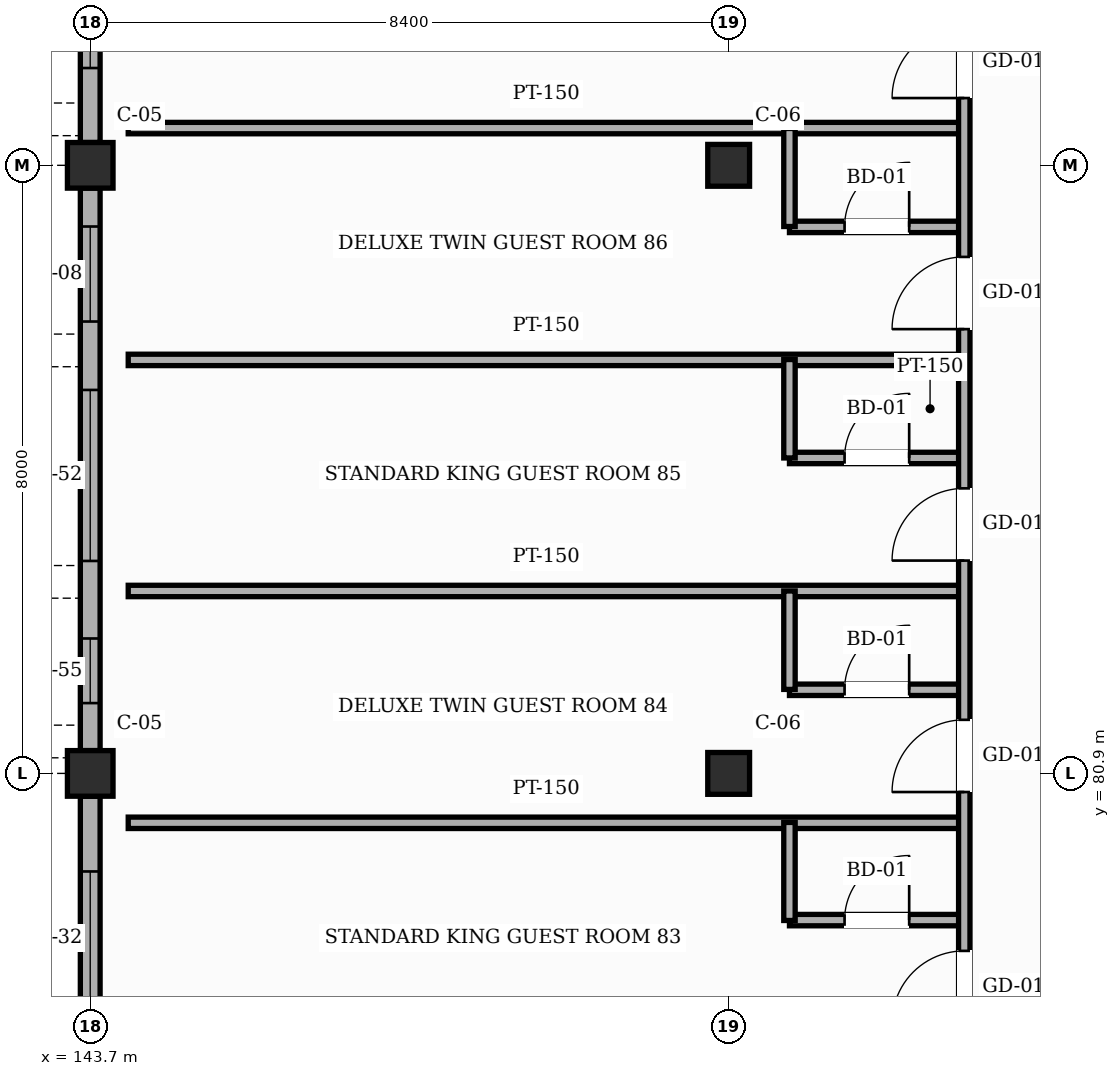
"""IFC4 building model, lengths in metres.
Left out: names, types, materials, properties, quantities, classifications, styles, units other than length and angle.
Written with IfcOpenShell. Run it as: python <this file> out.ifc"""

import sys

from ifc_helpers import new_model, si_unit, direction, frame, frame_2d, origin, origin_2d, place, context, subcontext, project, spatial, rectangle, hollow_rectangle, extrude, element, fill, save


model = new_model("IFC4")
c1 = context("Model", 3, precision=1e-05, world=origin(), true_north=direction((0.0, 1.0)))
c2 = subcontext(c1, "Body", "Model", "MODEL_VIEW")
j1 = project(units=[si_unit("LENGTHUNIT", "METRE"), si_unit("PLANEANGLEUNIT", "RADIAN")], contexts=[c1])
p1 = place(None, origin())
s1 = spatial("IfcSite", under=j1, at=p1, CompositionType="ELEMENT")
p2 = place(p1, origin())
s2 = spatial("IfcBuilding", under=s1, at=p2, CompositionType="ELEMENT")
p3 = place(p2, frame((0.0, 0.0, 24.6)))
s3 = spatial("IfcBuildingStorey", under=s2, at=p3, CompositionType="ELEMENT", Elevation=24.6)
for number, where, z_axis, x_axis in (
    (1, (143.7, 80.9, 0.0), (0.0, 0.0, 1.0), (1.0, 0.0, 0.0)),
    (2, (143.7, 88.9, 0.0), (0.0, 0.0, 1.0), (1.0, 0.0, 0.0)),
):
    element("IfcColumn", number, at=place(p3, frame(where, z_axis=z_axis, x_axis=x_axis)), inside=s3, PredefinedType="COLUMN", context=c2, shape_type="SweptSolid", body=[
        extrude(hollow_rectangle(XDim=0.6, YDim=0.6, WallThickness=0.025, InnerFilletRadius=0.025, OuterFilletRadius=0.05, at=origin_2d()), origin(), (0.0, 0.0, 1.0), 3.6),
    ])
for number, where, z_axis, x_axis in (
    (3, (152.1, 80.9, 0.0), (0.0, 0.0, 1.0), (1.0, 0.0, 0.0)),
    (4, (152.1, 88.9, 0.0), (0.0, 0.0, 1.0), (1.0, 0.0, 0.0)),
):
    element("IfcColumn", number, at=place(p3, frame(where, z_axis=z_axis, x_axis=x_axis)), inside=s3, PredefinedType="COLUMN", context=c2, shape_type="SweptSolid", body=[
        extrude(hollow_rectangle(XDim=0.55, YDim=0.55, WallThickness=0.022, InnerFilletRadius=0.022, OuterFilletRadius=0.044, at=origin_2d()), origin(), (0.0, 0.0, 1.0), 3.6),
    ])
p4 = place(p3, frame((143.7, 73.65, 0.0), z_axis=(0.0, 0.0, 1.0), x_axis=(0.0, 1.0, 0.0)))
e5 = element("IfcWall", 5, at=p4, inside=s3, PredefinedType="SOLIDWALL", context=c2, shape_type="SweptSolid", body=[
    extrude(rectangle(XDim=6.95, YDim=0.26, at=frame_2d((3.475, 0.0))), origin(), (0.0, 0.0, 1.0), 2.805),
])
p5 = place(p4, frame((1.265, 0.0, 0.85)))
e6 = element("IfcOpeningElement", 6, at=p5, cuts=e5, PredefinedType="OPENING", context=c2, shape_type="SweptSolid", body=[
    extrude(rectangle(XDim=1.55, YDim=1.5, at=frame_2d((0.775, 0.75))), frame((0.0, 0.14, 0.0), z_axis=(0.0, -1.0, 0.0), x_axis=(1.0, 0.0, 0.0)), (0.0, 0.0, 1.0), 0.28),
])
p6 = place(p4, frame((4.21, 0.0, 0.85)))
e7 = element("IfcOpeningElement", 7, at=p6, cuts=e5, PredefinedType="OPENING", context=c2, shape_type="SweptSolid", body=[
    extrude(rectangle(XDim=1.75, YDim=1.5, at=frame_2d((0.875, 0.75))), frame((0.0, 0.14, 0.0), z_axis=(0.0, -1.0, 0.0), x_axis=(1.0, 0.0, 0.0)), (0.0, 0.0, 1.0), 0.28),
])
p7 = place(p3, frame((143.7, 81.2, 0.0), z_axis=(0.0, 0.0, 1.0), x_axis=(0.0, 1.0, 0.0)))
e8 = element("IfcWall", 8, at=p7, inside=s3, PredefinedType="SOLIDWALL", context=c2, shape_type="SweptSolid", body=[
    extrude(rectangle(XDim=7.4, YDim=0.26, at=frame_2d((3.7, 0.0))), origin(), (0.0, 0.0, 1.0), 2.805),
])
p8 = place(p7, frame((0.625, 0.0, 0.85)))
e9 = element("IfcOpeningElement", 9, at=p8, cuts=e8, PredefinedType="OPENING", context=c2, shape_type="SweptSolid", body=[
    extrude(rectangle(XDim=0.85, YDim=1.35, at=frame_2d((0.425, 0.675))), frame((0.0, 0.14, 0.0), z_axis=(0.0, -1.0, 0.0), x_axis=(1.0, 0.0, 0.0)), (0.0, 0.0, 1.0), 0.28),
])
p9 = place(p7, frame((2.495, 0.0, 0.85)))
e10 = element("IfcOpeningElement", 10, at=p9, cuts=e8, PredefinedType="OPENING", context=c2, shape_type="SweptSolid", body=[
    extrude(rectangle(XDim=2.25, YDim=1.5, at=frame_2d((1.125, 0.75))), frame((0.0, 0.14, 0.0), z_axis=(0.0, -1.0, 0.0), x_axis=(1.0, 0.0, 0.0)), (0.0, 0.0, 1.0), 0.28),
])
p10 = place(p7, frame((5.645, 0.0, 0.85)))
e11 = element("IfcOpeningElement", 11, at=p10, cuts=e8, PredefinedType="OPENING", context=c2, shape_type="SweptSolid", body=[
    extrude(rectangle(XDim=1.25, YDim=1.65, at=frame_2d((0.625, 0.825))), frame((0.0, 0.14, 0.0), z_axis=(0.0, -1.0, 0.0), x_axis=(1.0, 0.0, 0.0)), (0.0, 0.0, 1.0), 0.28),
])
p11 = place(p3, frame((143.7, 89.2, 0.0), z_axis=(0.0, 0.0, 1.0), x_axis=(0.0, 1.0, 0.0)))
e12 = element("IfcWall", 12, at=p11, inside=s3, PredefinedType="SOLIDWALL", context=c2, shape_type="SweptSolid", body=[
    extrude(rectangle(XDim=7.4, YDim=0.26, at=frame_2d((3.7, 0.0))), origin(), (0.0, 0.0, 1.0), 2.805),
])
p12 = place(p11, frame((0.98, 0.0, 0.85)))
e13 = element("IfcOpeningElement", 13, at=p12, cuts=e12, PredefinedType="OPENING", context=c2, shape_type="SweptSolid", body=[
    extrude(rectangle(XDim=1.45, YDim=1.65, at=frame_2d((0.725, 0.825))), frame((0.0, 0.14, 0.0), z_axis=(0.0, -1.0, 0.0), x_axis=(1.0, 0.0, 0.0)), (0.0, 0.0, 1.0), 0.28),
])
p13 = place(p11, frame((3.925, 0.0, 0.85)))
e14 = element("IfcOpeningElement", 14, at=p13, cuts=e12, PredefinedType="OPENING", context=c2, shape_type="SweptSolid", body=[
    extrude(rectangle(XDim=1.65, YDim=1.65, at=frame_2d((0.825, 0.825))), frame((0.0, 0.14, 0.0), z_axis=(0.0, -1.0, 0.0), x_axis=(1.0, 0.0, 0.0)), (0.0, 0.0, 1.0), 0.28),
])
p14 = place(p3, frame((152.9, 78.97, 0.0), z_axis=(0.0, 0.0, 1.0), x_axis=(1.0, 0.0, 0.0)))
e15 = element("IfcWall", 15, at=p14, inside=s3, PredefinedType="PARTITIONING", context=c2, shape_type="SweptSolid", body=[
    extrude(rectangle(XDim=2.3, YDim=0.15, at=frame_2d((1.15, 0.0))), origin(), (0.0, 0.0, 1.0), 3.365),
])
p15 = place(p14, frame((0.725, 0.0, 0.0)))
e16 = element("IfcOpeningElement", 16, at=p15, cuts=e15, PredefinedType="OPENING", context=c2, shape_type="SweptSolid", body=[
    extrude(rectangle(XDim=0.85, YDim=2.1, at=frame_2d((0.425, 1.05))), frame((0.0, 0.085, 0.0), z_axis=(0.0, -1.0, 0.0), x_axis=(1.0, 0.0, 0.0)), (0.0, 0.0, 1.0), 0.17),
])
p16 = place(p3, frame((144.2, 80.25, 0.0), z_axis=(0.0, 0.0, 1.0), x_axis=(1.0, 0.0, 0.0)))
e17 = element("IfcWall", 17, at=p16, inside=s3, PredefinedType="PARTITIONING", context=c2, shape_type="SweptSolid", body=[
    extrude(rectangle(XDim=11.0, YDim=0.15, at=frame_2d((5.5, 0.0))), origin(), (0.0, 0.0, 1.0), 3.365),
])
p17 = place(p3, frame((152.9, 82.0, 0.0), z_axis=(0.0, 0.0, 1.0), x_axis=(1.0, 0.0, 0.0)))
e18 = element("IfcWall", 18, at=p17, inside=s3, PredefinedType="PARTITIONING", context=c2, shape_type="SweptSolid", body=[
    extrude(rectangle(XDim=2.3, YDim=0.15, at=frame_2d((1.15, 0.0))), origin(), (0.0, 0.0, 1.0), 3.365),
])
p18 = place(p17, frame((0.725, 0.0, 0.0)))
e19 = element("IfcOpeningElement", 19, at=p18, cuts=e18, PredefinedType="OPENING", context=c2, shape_type="SweptSolid", body=[
    extrude(rectangle(XDim=0.85, YDim=2.1, at=frame_2d((0.425, 1.05))), frame((0.0, 0.085, 0.0), z_axis=(0.0, -1.0, 0.0), x_axis=(1.0, 0.0, 0.0)), (0.0, 0.0, 1.0), 0.17),
])
p19 = place(p3, frame((144.2, 83.3, 0.0), z_axis=(0.0, 0.0, 1.0), x_axis=(1.0, 0.0, 0.0)))
e20 = element("IfcWall", 20, at=p19, inside=s3, PredefinedType="PARTITIONING", context=c2, shape_type="SweptSolid", body=[
    extrude(rectangle(XDim=11.0, YDim=0.15, at=frame_2d((5.5, 0.0))), origin(), (0.0, 0.0, 1.0), 3.365),
])
p20 = place(p3, frame((152.9, 85.05, 0.0), z_axis=(0.0, 0.0, 1.0), x_axis=(1.0, 0.0, 0.0)))
e21 = element("IfcWall", 21, at=p20, inside=s3, PredefinedType="PARTITIONING", context=c2, shape_type="SweptSolid", body=[
    extrude(rectangle(XDim=2.3, YDim=0.15, at=frame_2d((1.15, 0.0))), origin(), (0.0, 0.0, 1.0), 3.005),
])
p21 = place(p20, frame((0.725, 0.0, 0.0)))
e22 = element("IfcOpeningElement", 22, at=p21, cuts=e21, PredefinedType="OPENING", context=c2, shape_type="SweptSolid", body=[
    extrude(rectangle(XDim=0.85, YDim=2.1, at=frame_2d((0.425, 1.05))), frame((0.0, 0.085, 0.0), z_axis=(0.0, -1.0, 0.0), x_axis=(1.0, 0.0, 0.0)), (0.0, 0.0, 1.0), 0.17),
])
p22 = place(p3, frame((144.2, 86.34, 0.0), z_axis=(0.0, 0.0, 1.0), x_axis=(1.0, 0.0, 0.0)))
e23 = element("IfcWall", 23, at=p22, inside=s3, PredefinedType="PARTITIONING", context=c2, shape_type="SweptSolid", body=[
    extrude(rectangle(XDim=11.0, YDim=0.15, at=frame_2d((5.5, 0.0))), origin(), (0.0, 0.0, 1.0), 3.365),
])
p23 = place(p3, frame((152.9, 88.09, 0.0), z_axis=(0.0, 0.0, 1.0), x_axis=(1.0, 0.0, 0.0)))
e24 = element("IfcWall", 24, at=p23, inside=s3, PredefinedType="PARTITIONING", context=c2, shape_type="SweptSolid", body=[
    extrude(rectangle(XDim=2.3, YDim=0.15, at=frame_2d((1.15, 0.0))), origin(), (0.0, 0.0, 1.0), 3.365),
])
p24 = place(p23, frame((0.725, 0.0, 0.0)))
e25 = element("IfcOpeningElement", 25, at=p24, cuts=e24, PredefinedType="OPENING", context=c2, shape_type="SweptSolid", body=[
    extrude(rectangle(XDim=0.85, YDim=2.1, at=frame_2d((0.425, 1.05))), frame((0.0, 0.085, 0.0), z_axis=(0.0, -1.0, 0.0), x_axis=(1.0, 0.0, 0.0)), (0.0, 0.0, 1.0), 0.17),
])
p25 = place(p3, frame((144.2, 89.39, 0.0), z_axis=(0.0, 0.0, 1.0), x_axis=(1.0, 0.0, 0.0)))
e26 = element("IfcWall", 26, at=p25, inside=s3, PredefinedType="PARTITIONING", context=c2, shape_type="SweptSolid", body=[
    extrude(rectangle(XDim=11.0, YDim=0.15, at=frame_2d((5.5, 0.0))), origin(), (0.0, 0.0, 1.0), 3.365),
])
p26 = place(p3, frame((152.9, 78.965, 0.0), z_axis=(0.0, 0.0, 1.0), x_axis=(0.0, 1.0, 0.0)))
e27 = element("IfcWall", 27, at=p26, inside=s3, PredefinedType="PARTITIONING", context=c2, shape_type="SweptSolid", body=[
    extrude(rectangle(XDim=1.29, YDim=0.15, at=frame_2d((0.645, 0.0))), origin(), (0.0, 0.0, 1.0), 3.365),
])
p27 = place(p3, frame((152.9, 82.005, 0.0), z_axis=(0.0, 0.0, 1.0), x_axis=(0.0, 1.0, 0.0)))
e28 = element("IfcWall", 28, at=p27, inside=s3, PredefinedType="PARTITIONING", context=c2, shape_type="SweptSolid", body=[
    extrude(rectangle(XDim=1.295, YDim=0.15, at=frame_2d((0.647, 0.0))), origin(), (0.0, 0.0, 1.0), 3.365),
])
p28 = place(p3, frame((152.9, 85.05, 0.0), z_axis=(0.0, 0.0, 1.0), x_axis=(0.0, 1.0, 0.0)))
e29 = element("IfcWall", 29, at=p28, inside=s3, PredefinedType="PARTITIONING", context=c2, shape_type="SweptSolid", body=[
    extrude(rectangle(XDim=1.295, YDim=0.15, at=frame_2d((0.647, 0.0))), origin(), (0.0, 0.0, 1.0), 3.365),
])
p29 = place(p3, frame((152.9, 88.095, 0.0), z_axis=(0.0, 0.0, 1.0), x_axis=(0.0, 1.0, 0.0)))
e30 = element("IfcWall", 30, at=p29, inside=s3, PredefinedType="PARTITIONING", context=c2, shape_type="SweptSolid", body=[
    extrude(rectangle(XDim=1.29, YDim=0.15, at=frame_2d((0.645, 0.0))), origin(), (0.0, 0.0, 1.0), 3.365),
])
p30 = place(p3, frame((155.2, 62.0, 0.0), z_axis=(0.0, 0.0, 1.0), x_axis=(0.0, 1.0, 0.0)))
e31 = element("IfcWall", 31, at=p30, inside=s3, PredefinedType="PARTITIONING", context=c2, shape_type="SweptSolid", body=[
    extrude(rectangle(XDim=42.6, YDim=0.15, at=frame_2d((21.3, 0.0))), origin(), (0.0, 0.0, 1.0), 3.365),
])
p31 = place(p30, frame((0.4, 0.0, 0.0)))
e32 = element("IfcOpeningElement", 32, at=p31, cuts=e31, PredefinedType="OPENING", context=c2, shape_type="SweptSolid", body=[
    extrude(rectangle(XDim=0.95, YDim=2.15, at=frame_2d((0.475, 1.075))), frame((0.0, 0.085, 0.0), z_axis=(0.0, -1.0, 0.0), x_axis=(1.0, 0.0, 0.0)), (0.0, 0.0, 1.0), 0.17),
])
p32 = place(p30, frame((3.445, 0.0, 0.0)))
e33 = element("IfcOpeningElement", 33, at=p32, cuts=e31, PredefinedType="OPENING", context=c2, shape_type="SweptSolid", body=[
    extrude(rectangle(XDim=0.95, YDim=2.15, at=frame_2d((0.475, 1.075))), frame((0.0, 0.085, 0.0), z_axis=(0.0, -1.0, 0.0), x_axis=(1.0, 0.0, 0.0)), (0.0, 0.0, 1.0), 0.17),
])
p33 = place(p30, frame((6.485, 0.0, 0.0)))
e34 = element("IfcOpeningElement", 34, at=p33, cuts=e31, PredefinedType="OPENING", context=c2, shape_type="SweptSolid", body=[
    extrude(rectangle(XDim=0.95, YDim=2.15, at=frame_2d((0.475, 1.075))), frame((0.0, 0.085, 0.0), z_axis=(0.0, -1.0, 0.0), x_axis=(1.0, 0.0, 0.0)), (0.0, 0.0, 1.0), 0.17),
])
p34 = place(p30, frame((9.53, 0.0, 0.0)))
e35 = element("IfcOpeningElement", 35, at=p34, cuts=e31, PredefinedType="OPENING", context=c2, shape_type="SweptSolid", body=[
    extrude(rectangle(XDim=0.95, YDim=2.15, at=frame_2d((0.475, 1.075))), frame((0.0, 0.085, 0.0), z_axis=(0.0, -1.0, 0.0), x_axis=(1.0, 0.0, 0.0)), (0.0, 0.0, 1.0), 0.17),
])
p35 = place(p30, frame((12.57, 0.0, 0.0)))
e36 = element("IfcOpeningElement", 36, at=p35, cuts=e31, PredefinedType="OPENING", context=c2, shape_type="SweptSolid", body=[
    extrude(rectangle(XDim=0.95, YDim=2.15, at=frame_2d((0.475, 1.075))), frame((0.0, 0.085, 0.0), z_axis=(0.0, -1.0, 0.0), x_axis=(1.0, 0.0, 0.0)), (0.0, 0.0, 1.0), 0.17),
])
p36 = place(p30, frame((15.615, 0.0, 0.0)))
e37 = element("IfcOpeningElement", 37, at=p36, cuts=e31, PredefinedType="OPENING", context=c2, shape_type="SweptSolid", body=[
    extrude(rectangle(XDim=0.95, YDim=2.15, at=frame_2d((0.475, 1.075))), frame((0.0, 0.085, 0.0), z_axis=(0.0, -1.0, 0.0), x_axis=(1.0, 0.0, 0.0)), (0.0, 0.0, 1.0), 0.17),
])
p37 = place(p30, frame((18.655, 0.0, 0.0)))
e38 = element("IfcOpeningElement", 38, at=p37, cuts=e31, PredefinedType="OPENING", context=c2, shape_type="SweptSolid", body=[
    extrude(rectangle(XDim=0.95, YDim=2.15, at=frame_2d((0.475, 1.075))), frame((0.0, 0.085, 0.0), z_axis=(0.0, -1.0, 0.0), x_axis=(1.0, 0.0, 0.0)), (0.0, 0.0, 1.0), 0.17),
])
p38 = place(p30, frame((21.7, 0.0, 0.0)))
e39 = element("IfcOpeningElement", 39, at=p38, cuts=e31, PredefinedType="OPENING", context=c2, shape_type="SweptSolid", body=[
    extrude(rectangle(XDim=0.95, YDim=2.15, at=frame_2d((0.475, 1.075))), frame((0.0, 0.085, 0.0), z_axis=(0.0, -1.0, 0.0), x_axis=(1.0, 0.0, 0.0)), (0.0, 0.0, 1.0), 0.17),
])
p39 = place(p30, frame((24.745, 0.0, 0.0)))
e40 = element("IfcOpeningElement", 40, at=p39, cuts=e31, PredefinedType="OPENING", context=c2, shape_type="SweptSolid", body=[
    extrude(rectangle(XDim=0.95, YDim=2.15, at=frame_2d((0.475, 1.075))), frame((0.0, 0.085, 0.0), z_axis=(0.0, -1.0, 0.0), x_axis=(1.0, 0.0, 0.0)), (0.0, 0.0, 1.0), 0.17),
])
p40 = place(p30, frame((27.785, 0.0, 0.0)))
e41 = element("IfcOpeningElement", 41, at=p40, cuts=e31, PredefinedType="OPENING", context=c2, shape_type="SweptSolid", body=[
    extrude(rectangle(XDim=0.95, YDim=2.15, at=frame_2d((0.475, 1.075))), frame((0.0, 0.085, 0.0), z_axis=(0.0, -1.0, 0.0), x_axis=(1.0, 0.0, 0.0)), (0.0, 0.0, 1.0), 0.17),
])
p41 = place(p30, frame((30.83, 0.0, 0.0)))
e42 = element("IfcOpeningElement", 42, at=p41, cuts=e31, PredefinedType="OPENING", context=c2, shape_type="SweptSolid", body=[
    extrude(rectangle(XDim=0.95, YDim=2.15, at=frame_2d((0.475, 1.075))), frame((0.0, 0.085, 0.0), z_axis=(0.0, -1.0, 0.0), x_axis=(1.0, 0.0, 0.0)), (0.0, 0.0, 1.0), 0.17),
])
p42 = place(p30, frame((33.87, 0.0, 0.0)))
e43 = element("IfcOpeningElement", 43, at=p42, cuts=e31, PredefinedType="OPENING", context=c2, shape_type="SweptSolid", body=[
    extrude(rectangle(XDim=0.95, YDim=2.15, at=frame_2d((0.475, 1.075))), frame((0.0, 0.085, 0.0), z_axis=(0.0, -1.0, 0.0), x_axis=(1.0, 0.0, 0.0)), (0.0, 0.0, 1.0), 0.17),
])
p43 = place(p30, frame((36.915, 0.0, 0.0)))
e44 = element("IfcOpeningElement", 44, at=p43, cuts=e31, PredefinedType="OPENING", context=c2, shape_type="SweptSolid", body=[
    extrude(rectangle(XDim=0.95, YDim=2.15, at=frame_2d((0.475, 1.075))), frame((0.0, 0.085, 0.0), z_axis=(0.0, -1.0, 0.0), x_axis=(1.0, 0.0, 0.0)), (0.0, 0.0, 1.0), 0.17),
])
p44 = place(p30, frame((39.955, 0.0, 0.0)))
e45 = element("IfcOpeningElement", 45, at=p44, cuts=e31, PredefinedType="OPENING", context=c2, shape_type="SweptSolid", body=[
    extrude(rectangle(XDim=0.95, YDim=2.15, at=frame_2d((0.475, 1.075))), frame((0.0, 0.085, 0.0), z_axis=(0.0, -1.0, 0.0), x_axis=(1.0, 0.0, 0.0)), (0.0, 0.0, 1.0), 0.17),
])
p45 = place(p6, origin())
e46 = element("IfcWindow", 46, at=p45, inside=s3, PartitioningType="SINGLE_PANEL", PredefinedType="WINDOW", context=c2, shape_type="SweptSolid", body=[
    extrude(rectangle(XDim=1.75, YDim=1.5, at=frame_2d((0.875, 0.75))), frame((0.0, 0.03, 0.0), z_axis=(0.0, -1.0, 0.0), x_axis=(1.0, 0.0, 0.0)), (0.0, 0.0, 1.0), 0.06),
])
fill(e7, e46)
p46 = place(p8, origin())
e47 = element("IfcWindow", 47, at=p46, inside=s3, PartitioningType="SINGLE_PANEL", PredefinedType="WINDOW", context=c2, shape_type="SweptSolid", body=[
    extrude(rectangle(XDim=0.85, YDim=1.35, at=frame_2d((0.425, 0.675))), frame((0.0, 0.03, 0.0), z_axis=(0.0, -1.0, 0.0), x_axis=(1.0, 0.0, 0.0)), (0.0, 0.0, 1.0), 0.06),
])
fill(e9, e47)
p47 = place(p9, origin())
e48 = element("IfcWindow", 48, at=p47, inside=s3, PartitioningType="SINGLE_PANEL", PredefinedType="WINDOW", context=c2, shape_type="SweptSolid", body=[
    extrude(rectangle(XDim=2.25, YDim=1.5, at=frame_2d((1.125, 0.75))), frame((0.0, 0.03, 0.0), z_axis=(0.0, -1.0, 0.0), x_axis=(1.0, 0.0, 0.0)), (0.0, 0.0, 1.0), 0.06),
])
fill(e10, e48)
p48 = place(p10, origin())
e49 = element("IfcWindow", 49, at=p48, inside=s3, PartitioningType="SINGLE_PANEL", PredefinedType="WINDOW", context=c2, shape_type="SweptSolid", body=[
    extrude(rectangle(XDim=1.25, YDim=1.65, at=frame_2d((0.625, 0.825))), frame((0.0, 0.03, 0.0), z_axis=(0.0, -1.0, 0.0), x_axis=(1.0, 0.0, 0.0)), (0.0, 0.0, 1.0), 0.06),
])
fill(e11, e49)
p49 = place(p12, origin())
e50 = element("IfcWindow", 50, at=p49, inside=s3, PartitioningType="SINGLE_PANEL", PredefinedType="WINDOW", context=c2, shape_type="SweptSolid", body=[
    extrude(rectangle(XDim=1.45, YDim=1.65, at=frame_2d((0.725, 0.825))), frame((0.0, 0.03, 0.0), z_axis=(0.0, -1.0, 0.0), x_axis=(1.0, 0.0, 0.0)), (0.0, 0.0, 1.0), 0.06),
])
fill(e13, e50)
p50 = place(p36, origin())
e51 = element("IfcDoor", 51, at=p50, inside=s3, OperationType="SINGLE_SWING_LEFT", PredefinedType="DOOR", context=c2, shape_type="SweptSolid", body=[
    extrude(rectangle(XDim=0.95, YDim=2.15, at=frame_2d((0.475, 1.075))), frame((0.0, 0.025, 0.0), z_axis=(0.0, -1.0, 0.0), x_axis=(1.0, 0.0, 0.0)), (0.0, 0.0, 1.0), 0.05),
])
fill(e37, e51)
p51 = place(p15, origin())
e52 = element("IfcDoor", 52, at=p51, inside=s3, OperationType="SINGLE_SWING_RIGHT", PredefinedType="DOOR", context=c2, shape_type="SweptSolid", body=[
    extrude(rectangle(XDim=0.85, YDim=2.1, at=frame_2d((0.425, 1.05))), frame((0.0, 0.025, 0.0), z_axis=(0.0, -1.0, 0.0), x_axis=(1.0, 0.0, 0.0)), (0.0, 0.0, 1.0), 0.05),
])
fill(e16, e52)
p52 = place(p37, origin())
e53 = element("IfcDoor", 53, at=p52, inside=s3, OperationType="SINGLE_SWING_LEFT", PredefinedType="DOOR", context=c2, shape_type="SweptSolid", body=[
    extrude(rectangle(XDim=0.95, YDim=2.15, at=frame_2d((0.475, 1.075))), frame((0.0, 0.025, 0.0), z_axis=(0.0, -1.0, 0.0), x_axis=(1.0, 0.0, 0.0)), (0.0, 0.0, 1.0), 0.05),
])
fill(e38, e53)
p53 = place(p18, origin())
e54 = element("IfcDoor", 54, at=p53, inside=s3, OperationType="SINGLE_SWING_RIGHT", PredefinedType="DOOR", context=c2, shape_type="SweptSolid", body=[
    extrude(rectangle(XDim=0.85, YDim=2.1, at=frame_2d((0.425, 1.05))), frame((0.0, 0.025, 0.0), z_axis=(0.0, -1.0, 0.0), x_axis=(1.0, 0.0, 0.0)), (0.0, 0.0, 1.0), 0.05),
])
fill(e19, e54)
p54 = place(p38, origin())
e55 = element("IfcDoor", 55, at=p54, inside=s3, OperationType="SINGLE_SWING_LEFT", PredefinedType="DOOR", context=c2, shape_type="SweptSolid", body=[
    extrude(rectangle(XDim=0.95, YDim=2.15, at=frame_2d((0.475, 1.075))), frame((0.0, 0.025, 0.0), z_axis=(0.0, -1.0, 0.0), x_axis=(1.0, 0.0, 0.0)), (0.0, 0.0, 1.0), 0.05),
])
fill(e39, e55)
p55 = place(p21, origin())
e56 = element("IfcDoor", 56, at=p55, inside=s3, OperationType="SINGLE_SWING_RIGHT", PredefinedType="DOOR", context=c2, shape_type="SweptSolid", body=[
    extrude(rectangle(XDim=0.85, YDim=2.1, at=frame_2d((0.425, 1.05))), frame((0.0, 0.025, 0.0), z_axis=(0.0, -1.0, 0.0), x_axis=(1.0, 0.0, 0.0)), (0.0, 0.0, 1.0), 0.05),
])
fill(e22, e56)
p56 = place(p39, origin())
e57 = element("IfcDoor", 57, at=p56, inside=s3, OperationType="SINGLE_SWING_LEFT", PredefinedType="DOOR", context=c2, shape_type="SweptSolid", body=[
    extrude(rectangle(XDim=0.95, YDim=2.15, at=frame_2d((0.475, 1.075))), frame((0.0, 0.025, 0.0), z_axis=(0.0, -1.0, 0.0), x_axis=(1.0, 0.0, 0.0)), (0.0, 0.0, 1.0), 0.05),
])
fill(e40, e57)
p57 = place(p24, origin())
e58 = element("IfcDoor", 58, at=p57, inside=s3, OperationType="SINGLE_SWING_RIGHT", PredefinedType="DOOR", context=c2, shape_type="SweptSolid", body=[
    extrude(rectangle(XDim=0.85, YDim=2.1, at=frame_2d((0.425, 1.05))), frame((0.0, 0.025, 0.0), z_axis=(0.0, -1.0, 0.0), x_axis=(1.0, 0.0, 0.0)), (0.0, 0.0, 1.0), 0.05),
])
fill(e25, e58)
p58 = place(p40, origin())
e59 = element("IfcDoor", 59, at=p58, inside=s3, OperationType="SINGLE_SWING_LEFT", PredefinedType="DOOR", context=c2, shape_type="SweptSolid", body=[
    extrude(rectangle(XDim=0.95, YDim=2.15, at=frame_2d((0.475, 1.075))), frame((0.0, 0.025, 0.0), z_axis=(0.0, -1.0, 0.0), x_axis=(1.0, 0.0, 0.0)), (0.0, 0.0, 1.0), 0.05),
])
fill(e41, e59)
save(model, sys.argv[1])
